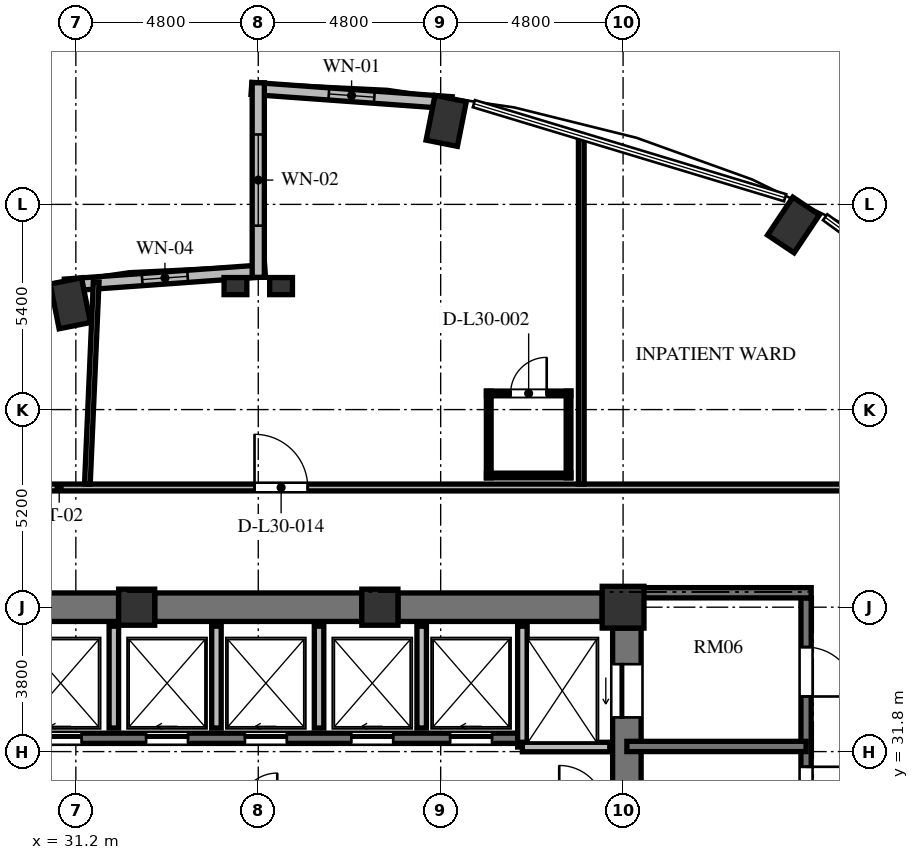
"""IFC4 building model, lengths in metres.
Left out: names, types, materials, properties, quantities, classifications, styles, units other than length and angle.
Written with IfcOpenShell. Run it as: python <this file> out.ifc"""

import sys

from ifc_helpers import new_model, si_unit, direction, frame, frame_2d, origin, origin_2d, place, context, subcontext, project, spatial, rectangle, extrude, element, fill, save


model = new_model("IFC4")
c1 = context("Model", 3, precision=1e-05, world=origin(), true_north=direction((0.0, 1.0)))
c2 = subcontext(c1, "Body", "Model", "MODEL_VIEW")
j1 = project(units=[si_unit("LENGTHUNIT", "METRE"), si_unit("PLANEANGLEUNIT", "RADIAN")], contexts=[c1])
p1 = place(None, origin())
s1 = spatial("IfcSite", under=j1, at=p1, CompositionType="ELEMENT")
p2 = place(p1, origin())
s2 = spatial("IfcBuilding", under=s1, at=p2, CompositionType="ELEMENT")
p3 = place(p2, frame((0.0, 0.0, 118.224)))
s3 = spatial("IfcBuildingStorey", under=s2, at=p3, CompositionType="ELEMENT", Elevation=118.224)
for number, where, z_axis, x_axis in (
    (1, (50.084, 45.657, 0.0), (0.0, 0.0, 1.0), (0.556, 0.831, 0.0)),
    (2, (40.946, 48.397, 0.0), (0.0, 0.0, 1.0), (0.195, 0.981, 0.0)),
    (3, (31.054, 43.597, 0.0), (0.0, 0.0, 1.0), (-0.195, 0.981, 0.0)),
):
    element("IfcColumn", number, at=place(p3, frame(where, z_axis=z_axis, x_axis=x_axis)), inside=s3, PredefinedType="COLUMN", context=c2, shape_type="SweptSolid", body=[
        extrude(rectangle(XDim=1.2, YDim=0.84, at=origin_2d()), origin(), (0.0, 0.0, 1.0), 3.648),
    ])
p4 = place(p3, frame((45.6, 35.6, 0.0), z_axis=(0.0, 0.0, 1.0), x_axis=(1.0, 0.0, 0.0)))
e4 = element("IfcColumn", 4, at=p4, inside=s3, PredefinedType="COLUMN", context=c2, shape_type="SweptSolid", body=[
    extrude(rectangle(XDim=1.1, YDim=1.1, at=origin_2d()), origin(), (0.0, 0.0, 1.0), 3.648),
])
for number, where, z_axis, x_axis in (
    (5, (39.2, 35.6, 0.0), (0.0, 0.0, 1.0), (1.0, 0.0, 0.0)),
    (6, (32.8, 35.6, 0.0), (0.0, 0.0, 1.0), (1.0, 0.0, 0.0)),
):
    element("IfcColumn", number, at=place(p3, frame(where, z_axis=z_axis, x_axis=x_axis)), inside=s3, PredefinedType="COLUMN", context=c2, shape_type="SweptSolid", body=[
        extrude(rectangle(XDim=0.95, YDim=0.95, at=origin_2d()), origin(), (0.0, 0.0, 1.0), 3.648),
    ])
for number, where, z_axis, x_axis in (
    (7, (35.4, 44.05, 0.0), (0.0, 0.0, 1.0), (1.0, 0.0, 0.0)),
    (8, (36.6, 44.05, 0.0), (0.0, 0.0, 1.0), (1.0, 0.0, 0.0)),
):
    element("IfcColumn", number, at=place(p3, frame(where, z_axis=z_axis, x_axis=x_axis)), inside=s3, PredefinedType="PILASTER", context=c2, shape_type="SweptSolid", body=[
        extrude(rectangle(XDim=0.6, YDim=0.45, at=origin_2d()), origin(), (0.0, 0.0, 1.0), 3.648),
    ])
p5 = place(p3, frame((45.7, 20.95, 0.0), z_axis=(0.0, 0.0, 1.0), x_axis=(0.0, 1.0, 0.0)))
e9 = element("IfcWall", 9, at=p5, inside=s3, PredefinedType="SHEAR", context=c2, shape_type="SweptSolid", body=[
    extrude(rectangle(XDim=14.1, YDim=0.75, at=frame_2d((7.05, 0.0))), origin(), (0.0, 0.0, 1.0), 3.648),
])
p6 = place(p5, frame((11.75, 0.0, 0.0)))
e10 = element("IfcOpeningElement", 10, at=p6, cuts=e9, PredefinedType="OPENING", context=c2, shape_type="SweptSolid", body=[
    extrude(rectangle(XDim=1.4, YDim=2.3, at=frame_2d((0.7, 1.15))), frame((0.0, 0.385, 0.0), z_axis=(0.0, -1.0, 0.0), x_axis=(1.0, 0.0, 0.0)), (0.0, 0.0, 1.0), 0.77),
])
p7 = place(p5, frame((0.95, 0.0, 0.0)))
e11 = element("IfcOpeningElement", 11, at=p7, cuts=e9, PredefinedType="OPENING", context=c2, shape_type="SweptSolid", body=[
    extrude(rectangle(XDim=1.4, YDim=2.3, at=frame_2d((0.7, 1.15))), frame((0.0, 0.385, 0.0), z_axis=(0.0, -1.0, 0.0), x_axis=(1.0, 0.0, 0.0)), (0.0, 0.0, 1.0), 0.77),
])
p8 = place(p3, frame((26.95, 35.6, 0.0), z_axis=(0.0, 0.0, 1.0), x_axis=(1.0, 0.0, 0.0)))
e12 = element("IfcWall", 12, at=p8, inside=s3, PredefinedType="SHEAR", context=c2, shape_type="SweptSolid", body=[
    extrude(rectangle(XDim=5.375, YDim=0.75, at=frame_2d((2.688, 0.0))), origin(), (0.0, 0.0, 1.0), 3.648),
])
p9 = place(p3, frame((33.275, 35.6, 0.0), z_axis=(0.0, 0.0, 1.0), x_axis=(1.0, 0.0, 0.0)))
e13 = element("IfcWall", 13, at=p9, inside=s3, PredefinedType="SHEAR", context=c2, shape_type="SweptSolid", body=[
    extrude(rectangle(XDim=5.45, YDim=0.75, at=frame_2d((2.725, 0.0))), origin(), (0.0, 0.0, 1.0), 3.648),
])
p10 = place(p3, frame((39.675, 35.6, 0.0), z_axis=(0.0, 0.0, 1.0), x_axis=(1.0, 0.0, 0.0)))
e14 = element("IfcWall", 14, at=p10, inside=s3, PredefinedType="SHEAR", context=c2, shape_type="SweptSolid", body=[
    extrude(rectangle(XDim=5.375, YDim=0.75, at=frame_2d((2.688, 0.0))), origin(), (0.0, 0.0, 1.0), 3.648),
])
p11 = place(p3, frame((41.091, 48.875, 0.0), z_axis=(0.0, 0.0, 1.0), x_axis=(-0.997432364291, 0.071614793619, 0.0)))
e15 = element("IfcWall", 15, at=p11, inside=s3, PredefinedType="SOLIDWALL", context=c2, shape_type="SweptSolid", body=[
    extrude(rectangle(XDim=5.284, YDim=0.32, at=frame_2d((2.642, 0.0))), origin(), (0.0, 0.0, 1.0), 3.428),
])
p12 = place(p11, frame((2.042, 0.0, 0.85)))
e16 = element("IfcOpeningElement", 16, at=p12, cuts=e15, PredefinedType="OPENING", context=c2, shape_type="SweptSolid", body=[
    extrude(rectangle(XDim=1.2, YDim=2.2, at=frame_2d((0.6, 1.1))), frame((0.0, 0.17, 0.0), z_axis=(0.0, -1.0, 0.0), x_axis=(1.0, 0.0, 0.0)), (0.0, 0.0, 1.0), 0.34),
])
p13 = place(p3, frame((36.179, 44.453, 0.0), z_axis=(0.0, 0.0, 1.0), x_axis=(-0.997431890304, -0.071621394884, 0.0)))
e17 = element("IfcWall", 17, at=p13, inside=s3, PredefinedType="SOLIDWALL", context=c2, shape_type="SweptSolid", body=[
    extrude(rectangle(XDim=5.284, YDim=0.32, at=frame_2d((2.642, 0.0))), origin(), (0.0, 0.0, 1.0), 3.428),
])
p14 = place(p13, frame((2.042, 0.0, 0.85)))
e18 = element("IfcOpeningElement", 18, at=p14, cuts=e17, PredefinedType="OPENING", context=c2, shape_type="SweptSolid", body=[
    extrude(rectangle(XDim=1.2, YDim=1.8, at=frame_2d((0.6, 0.9))), frame((0.0, 0.17, 0.0), z_axis=(0.0, -1.0, 0.0), x_axis=(1.0, 0.0, 0.0)), (0.0, 0.0, 1.0), 0.34),
])
p15 = place(p3, frame((36.0, 49.4, 0.0), z_axis=(0.0, 0.0, 1.0), x_axis=(0.0, -1.0, 0.0)))
e19 = element("IfcWall", 19, at=p15, inside=s3, PredefinedType="SOLIDWALL", context=c2, shape_type="SweptSolid", body=[
    extrude(rectangle(XDim=5.12, YDim=0.32, at=frame_2d((2.56, 0.0))), origin(), (0.0, 0.0, 1.0), 3.428),
])
p16 = place(p15, frame((1.36, 0.0, 0.84)))
e20 = element("IfcOpeningElement", 20, at=p16, cuts=e19, PredefinedType="OPENING", context=c2, shape_type="SweptSolid", body=[
    extrude(rectangle(XDim=2.4, YDim=2.04, at=frame_2d((1.2, 1.02))), frame((0.0, 0.17, 0.0), z_axis=(0.0, -1.0, 0.0), x_axis=(1.0, 0.0, 0.0)), (0.0, 0.0, 1.0), 0.34),
])
p17 = place(p3, frame((26.55, 32.15, 0.0), z_axis=(0.0, 0.0, 1.0), x_axis=(1.0, 0.0, 0.0)))
e21 = element("IfcWall", 21, at=p17, inside=s3, PredefinedType="SHEAR", context=c2, shape_type="SweptSolid", body=[
    extrude(rectangle(XDim=16.4, YDim=0.27, at=frame_2d((8.2, 0.0))), origin(), (0.0, 0.0, 1.0), 3.648),
])
p18 = place(p17, frame((1.1, 0.0, 0.0)))
e22 = element("IfcOpeningElement", 22, at=p18, cuts=e21, PredefinedType="OPENING", context=c2, shape_type="SweptSolid", body=[
    extrude(rectangle(XDim=1.1, YDim=2.2, at=frame_2d((0.55, 1.1))), frame((0.0, 0.145, 0.0), z_axis=(0.0, -1.0, 0.0), x_axis=(1.0, 0.0, 0.0)), (0.0, 0.0, 1.0), 0.29),
])
p19 = place(p17, frame((3.7, 0.0, 0.0)))
e23 = element("IfcOpeningElement", 23, at=p19, cuts=e21, PredefinedType="OPENING", context=c2, shape_type="SweptSolid", body=[
    extrude(rectangle(XDim=1.1, YDim=2.2, at=frame_2d((0.55, 1.1))), frame((0.0, 0.145, 0.0), z_axis=(0.0, -1.0, 0.0), x_axis=(1.0, 0.0, 0.0)), (0.0, 0.0, 1.0), 0.29),
])
p20 = place(p17, frame((6.5, 0.0, 0.0)))
e24 = element("IfcOpeningElement", 24, at=p20, cuts=e21, PredefinedType="OPENING", context=c2, shape_type="SweptSolid", body=[
    extrude(rectangle(XDim=1.1, YDim=2.2, at=frame_2d((0.55, 1.1))), frame((0.0, 0.145, 0.0), z_axis=(0.0, -1.0, 0.0), x_axis=(1.0, 0.0, 0.0)), (0.0, 0.0, 1.0), 0.29),
])
p21 = place(p17, frame((9.1, 0.0, 0.0)))
e25 = element("IfcOpeningElement", 25, at=p21, cuts=e21, PredefinedType="OPENING", context=c2, shape_type="SweptSolid", body=[
    extrude(rectangle(XDim=1.1, YDim=2.2, at=frame_2d((0.55, 1.1))), frame((0.0, 0.145, 0.0), z_axis=(0.0, -1.0, 0.0), x_axis=(1.0, 0.0, 0.0)), (0.0, 0.0, 1.0), 0.29),
])
p22 = place(p17, frame((11.9, 0.0, 0.0)))
e26 = element("IfcOpeningElement", 26, at=p22, cuts=e21, PredefinedType="OPENING", context=c2, shape_type="SweptSolid", body=[
    extrude(rectangle(XDim=1.1, YDim=2.2, at=frame_2d((0.55, 1.1))), frame((0.0, 0.145, 0.0), z_axis=(0.0, -1.0, 0.0), x_axis=(1.0, 0.0, 0.0)), (0.0, 0.0, 1.0), 0.29),
])
p23 = place(p17, frame((14.5, 0.0, 0.0)))
e27 = element("IfcOpeningElement", 27, at=p23, cuts=e21, PredefinedType="OPENING", context=c2, shape_type="SweptSolid", body=[
    extrude(rectangle(XDim=1.1, YDim=2.2, at=frame_2d((0.55, 1.1))), frame((0.0, 0.145, 0.0), z_axis=(0.0, -1.0, 0.0), x_axis=(1.0, 0.0, 0.0)), (0.0, 0.0, 1.0), 0.29),
])
p24 = place(p3, frame((42.95, 31.92, 0.0), z_axis=(0.0, 0.0, 1.0), x_axis=(0.0, 1.0, 0.0)))
e28 = element("IfcWall", 28, at=p24, inside=s3, PredefinedType="SOLIDWALL", context=c2, shape_type="SweptSolid", body=[
    extrude(rectangle(XDim=3.18, YDim=0.25, at=frame_2d((1.59, 0.0))), origin(), (0.0, 0.0, 1.0), 3.428),
])
p25 = place(p3, frame((42.95, 31.92, 0.0), z_axis=(0.0, 0.0, 1.0), x_axis=(1.0, 0.0, 0.0)))
e29 = element("IfcWall", 29, at=p25, inside=s3, PredefinedType="SOLIDWALL", context=c2, shape_type="SweptSolid", body=[
    extrude(rectangle(XDim=2.3, YDim=0.25, at=frame_2d((1.15, 0.0))), origin(), (0.0, 0.0, 1.0), 3.428),
])
for number, where, z_axis, x_axis in (
    (30, (32.2, 32.42, 0.0), (0.0, 0.0, 1.0), (0.0, 1.0, 0.0)),
    (31, (34.9, 32.42, 0.0), (0.0, 0.0, 1.0), (0.0, 1.0, 0.0)),
    (32, (37.6, 32.42, 0.0), (0.0, 0.0, 1.0), (0.0, 1.0, 0.0)),
    (33, (40.3, 32.42, 0.0), (0.0, 0.0, 1.0), (0.0, 1.0, 0.0)),
):
    element("IfcWall", number, at=place(p3, frame(where, z_axis=z_axis, x_axis=x_axis)), inside=s3, PredefinedType="SOLIDWALL", context=c2, shape_type="SweptSolid", body=[
        extrude(rectangle(XDim=2.68, YDim=0.25, at=frame_2d((1.34, 0.0))), origin(), (0.0, 0.0, 1.0), 3.428),
    ])
p26 = place(p3, frame((50.415, 35.845, 0.0), z_axis=(0.0, 0.0, 1.0), x_axis=(0.0, -1.0, 0.0)))
e34 = element("IfcWall", 34, at=p26, inside=s3, PredefinedType="SHEAR", context=c2, shape_type="SweptSolid", body=[
    extrude(rectangle(XDim=15.825, YDim=0.27, at=frame_2d((7.913, 0.0))), origin(), (0.0, 0.0, 1.0), 3.648),
])
p27 = place(p26, frame((4.445, 0.0, 0.0)))
e35 = element("IfcOpeningElement", 35, at=p27, cuts=e34, PredefinedType="OPENING", context=c2, shape_type="SweptSolid", body=[
    extrude(rectangle(XDim=1.2, YDim=2.15, at=frame_2d((0.6, 1.075))), frame((0.0, 0.145, 0.0), z_axis=(0.0, -1.0, 0.0), x_axis=(1.0, 0.0, 0.0)), (0.0, 0.0, 1.0), 0.29),
])
p28 = place(p26, frame((1.295, 0.0, 0.0)))
e36 = element("IfcOpeningElement", 36, at=p28, cuts=e34, PredefinedType="OPENING", context=c2, shape_type="SweptSolid", body=[
    extrude(rectangle(XDim=1.3, YDim=2.2, at=frame_2d((0.65, 1.1))), frame((0.0, 0.145, 0.0), z_axis=(0.0, -1.0, 0.0), x_axis=(1.0, 0.0, 0.0)), (0.0, 0.0, 1.0), 0.29),
])
p29 = place(p26, frame((13.095, 0.0, 0.0)))
e37 = element("IfcOpeningElement", 37, at=p29, cuts=e34, PredefinedType="OPENING", context=c2, shape_type="SweptSolid", body=[
    extrude(rectangle(XDim=1.3, YDim=2.2, at=frame_2d((0.65, 1.1))), frame((0.0, 0.145, 0.0), z_axis=(0.0, -1.0, 0.0), x_axis=(1.0, 0.0, 0.0)), (0.0, 0.0, 1.0), 0.29),
])
p30 = place(p3, frame((46.075, 35.98, 0.0), z_axis=(0.0, 0.0, 1.0), x_axis=(1.0, 0.0, 0.0)))
e38 = element("IfcWall", 38, at=p30, inside=s3, PredefinedType="SHEAR", context=c2, shape_type="SweptSolid", body=[
    extrude(rectangle(XDim=4.475, YDim=0.27, at=frame_2d((2.238, 0.0))), origin(), (0.0, 0.0, 1.0), 3.648),
])
p31 = place(p3, frame((45.7, 31.935, 0.0), z_axis=(0.0, 0.0, 1.0), x_axis=(1.0, 0.0, 0.0)))
e39 = element("IfcWall", 39, at=p31, inside=s3, PredefinedType="SHEAR", context=c2, shape_type="SweptSolid", body=[
    extrude(rectangle(XDim=4.715, YDim=0.27, at=frame_2d((2.357, 0.0))), origin(), (0.0, 0.0, 1.0), 3.648),
])
p32 = place(p3, frame((23.287, 38.75, 0.0), z_axis=(0.0, 0.0, 1.0), x_axis=(1.0, 0.0, 0.0)))
e40 = element("IfcWall", 40, at=p32, inside=s3, PredefinedType="PARTITIONING", context=c2, shape_type="SweptSolid", body=[
    extrude(rectangle(XDim=29.903, YDim=0.18, at=frame_2d((14.952, 0.0))), origin(), (0.0, 0.0, 1.0), 3.053),
])
p33 = place(p32, frame((12.615, 0.0, 0.0)))
e41 = element("IfcOpeningElement", 41, at=p33, cuts=e40, PredefinedType="OPENING", context=c2, shape_type="SweptSolid", body=[
    extrude(rectangle(XDim=1.4, YDim=2.2, at=frame_2d((0.7, 1.1))), frame((0.0, 0.1, 0.0), z_axis=(0.0, -1.0, 0.0), x_axis=(1.0, 0.0, 0.0)), (0.0, 0.0, 1.0), 0.2),
])
p34 = place(p32, frame((3.567, 0.0, 0.0)))
e42 = element("IfcOpeningElement", 42, at=p34, cuts=e40, PredefinedType="OPENING", context=c2, shape_type="SweptSolid", body=[
    extrude(rectangle(XDim=1.4, YDim=2.2, at=frame_2d((0.7, 1.1))), frame((0.0, 0.1, 0.0), z_axis=(0.0, -1.0, 0.0), x_axis=(1.0, 0.0, 0.0)), (0.0, 0.0, 1.0), 0.2),
])
p35 = place(p3, frame((31.503, 38.84, 0.0), z_axis=(0.0, 0.0, 1.0), x_axis=(0.043494903789, 0.999053648882, 0.0)))
e43 = element("IfcWall", 43, at=p35, inside=s3, PredefinedType="PARTITIONING", context=c2, shape_type="SweptSolid", body=[
    extrude(rectangle(XDim=5.327, YDim=0.15, at=frame_2d((2.664, 0.0))), origin(), (0.0, 0.0, 1.0), 2.813),
])
p36 = place(p3, frame((44.5, 38.84, 0.0), z_axis=(0.0, 0.0, 1.0), x_axis=(0.0, 1.0, 0.0)))
e44 = element("IfcWall", 44, at=p36, inside=s3, PredefinedType="PARTITIONING", context=c2, shape_type="SweptSolid", body=[
    extrude(rectangle(XDim=9.143, YDim=0.15, at=frame_2d((4.571, 0.0))), origin(), (0.0, 0.0, 1.0), 3.428),
])
p37 = place(p3, frame((42.005, 41.225, 0.0), z_axis=(0.0, 0.0, 1.0), x_axis=(1.0, 0.0, 0.0)))
e45 = element("IfcWall", 45, at=p37, inside=s3, PredefinedType="PARTITIONING", context=c2, shape_type="SweptSolid", body=[
    extrude(rectangle(XDim=2.22, YDim=0.125, at=frame_2d((1.11, 0.0))), origin(), (0.0, 0.0, 1.0), 3.428),
])
p38 = place(p37, frame((0.635, 0.0, 0.0)))
e46 = element("IfcOpeningElement", 46, at=p38, cuts=e45, PredefinedType="OPENING", context=c2, shape_type="SweptSolid", body=[
    extrude(rectangle(XDim=0.95, YDim=2.1, at=frame_2d((0.475, 1.05))), frame((0.0, 0.073, 0.0), z_axis=(0.0, -1.0, 0.0), x_axis=(1.0, 0.0, 0.0)), (0.0, 0.0, 1.0), 0.145),
])
p39 = place(p3, frame((42.005, 39.065, 0.0), z_axis=(0.0, 0.0, 1.0), x_axis=(1.0, 0.0, 0.0)))
e47 = element("IfcWall", 47, at=p39, inside=s3, PredefinedType="PARTITIONING", context=c2, shape_type="SweptSolid", body=[
    extrude(rectangle(XDim=2.22, YDim=0.125, at=frame_2d((1.11, 0.0))), origin(), (0.0, 0.0, 1.0), 3.428),
])
for number, where, z_axis, x_axis in (
    (48, (44.165, 39.005, 0.0), (0.0, 0.0, 1.0), (0.0, 1.0, 0.0)),
    (49, (42.065, 39.005, 0.0), (0.0, 0.0, 1.0), (0.0, 1.0, 0.0)),
):
    element("IfcWall", number, at=place(p3, frame(where, z_axis=z_axis, x_axis=x_axis)), inside=s3, PredefinedType="PARTITIONING", context=c2, shape_type="SweptSolid", body=[
        extrude(rectangle(XDim=2.28, YDim=0.125, at=frame_2d((1.14, 0.0))), origin(), (0.0, 0.0, 1.0), 3.428),
    ])
p40 = place(p12, origin())
e50 = element("IfcWindow", 50, at=p40, inside=s3, PartitioningType="SINGLE_PANEL", PredefinedType="WINDOW", context=c2, shape_type="SweptSolid", body=[
    extrude(rectangle(XDim=1.2, YDim=2.2, at=frame_2d((0.6, 1.1))), frame((0.0, 0.03, 0.0), z_axis=(0.0, -1.0, 0.0), x_axis=(1.0, 0.0, 0.0)), (0.0, 0.0, 1.0), 0.06),
])
fill(e16, e50)
p41 = place(p14, origin())
e51 = element("IfcWindow", 51, at=p41, inside=s3, PartitioningType="SINGLE_PANEL", PredefinedType="WINDOW", context=c2, shape_type="SweptSolid", body=[
    extrude(rectangle(XDim=1.2, YDim=1.8, at=frame_2d((0.6, 0.9))), frame((0.0, 0.03, 0.0), z_axis=(0.0, -1.0, 0.0), x_axis=(1.0, 0.0, 0.0)), (0.0, 0.0, 1.0), 0.06),
])
fill(e18, e51)
p42 = place(p16, origin())
e52 = element("IfcWindow", 52, at=p42, inside=s3, PartitioningType="SINGLE_PANEL", PredefinedType="WINDOW", context=c2, shape_type="SweptSolid", body=[
    extrude(rectangle(XDim=2.4, YDim=2.04, at=frame_2d((1.2, 1.02))), frame((0.0, 0.03, 0.0), z_axis=(0.0, -1.0, 0.0), x_axis=(1.0, 0.0, 0.0)), (0.0, 0.0, 1.0), 0.06),
])
fill(e20, e52)
p43 = place(p19, origin())
e53 = element("IfcDoor", 53, at=p43, inside=s3, OperationType="SLIDING_TO_LEFT", PredefinedType="DOOR", context=c2, shape_type="SweptSolid", body=[
    extrude(rectangle(XDim=1.1, YDim=2.2, at=frame_2d((0.55, 1.1))), frame((0.0, 0.025, 0.0), z_axis=(0.0, -1.0, 0.0), x_axis=(1.0, 0.0, 0.0)), (0.0, 0.0, 1.0), 0.05),
])
fill(e23, e53)
p44 = place(p20, origin())
e54 = element("IfcDoor", 54, at=p44, inside=s3, OperationType="SLIDING_TO_LEFT", PredefinedType="DOOR", context=c2, shape_type="SweptSolid", body=[
    extrude(rectangle(XDim=1.1, YDim=2.2, at=frame_2d((0.55, 1.1))), frame((0.0, 0.025, 0.0), z_axis=(0.0, -1.0, 0.0), x_axis=(1.0, 0.0, 0.0)), (0.0, 0.0, 1.0), 0.05),
])
fill(e24, e54)
p45 = place(p21, origin())
e55 = element("IfcDoor", 55, at=p45, inside=s3, OperationType="SLIDING_TO_LEFT", PredefinedType="DOOR", context=c2, shape_type="SweptSolid", body=[
    extrude(rectangle(XDim=1.1, YDim=2.2, at=frame_2d((0.55, 1.1))), frame((0.0, 0.025, 0.0), z_axis=(0.0, -1.0, 0.0), x_axis=(1.0, 0.0, 0.0)), (0.0, 0.0, 1.0), 0.05),
])
fill(e25, e55)
p46 = place(p22, origin())
e56 = element("IfcDoor", 56, at=p46, inside=s3, OperationType="SLIDING_TO_LEFT", PredefinedType="DOOR", context=c2, shape_type="SweptSolid", body=[
    extrude(rectangle(XDim=1.1, YDim=2.2, at=frame_2d((0.55, 1.1))), frame((0.0, 0.025, 0.0), z_axis=(0.0, -1.0, 0.0), x_axis=(1.0, 0.0, 0.0)), (0.0, 0.0, 1.0), 0.05),
])
fill(e26, e56)
p47 = place(p23, origin())
e57 = element("IfcDoor", 57, at=p47, inside=s3, OperationType="SLIDING_TO_LEFT", PredefinedType="DOOR", context=c2, shape_type="SweptSolid", body=[
    extrude(rectangle(XDim=1.1, YDim=2.2, at=frame_2d((0.55, 1.1))), frame((0.0, 0.025, 0.0), z_axis=(0.0, -1.0, 0.0), x_axis=(1.0, 0.0, 0.0)), (0.0, 0.0, 1.0), 0.05),
])
fill(e27, e57)
p48 = place(p6, origin())
e58 = element("IfcDoor", 58, at=p48, inside=s3, OperationType="SLIDING_TO_LEFT", PredefinedType="DOOR", context=c2, shape_type="SweptSolid", body=[
    extrude(rectangle(XDim=1.4, YDim=2.3, at=frame_2d((0.7, 1.15))), frame((0.0, 0.025, 0.0), z_axis=(0.0, -1.0, 0.0), x_axis=(1.0, 0.0, 0.0)), (0.0, 0.0, 1.0), 0.05),
])
fill(e10, e58)
p49 = place(p27, origin())
e59 = element("IfcDoor", 59, at=p49, inside=s3, OperationType="SINGLE_SWING_LEFT", PredefinedType="DOOR", context=c2, shape_type="SweptSolid", body=[
    extrude(rectangle(XDim=1.2, YDim=2.15, at=frame_2d((0.6, 1.075))), frame((0.0, 0.025, 0.0), z_axis=(0.0, -1.0, 0.0), x_axis=(1.0, 0.0, 0.0)), (0.0, 0.0, 1.0), 0.05),
])
fill(e35, e59)
p50 = place(p28, origin())
e60 = element("IfcDoor", 60, at=p50, inside=s3, OperationType="SINGLE_SWING_RIGHT", PredefinedType="DOOR", context=c2, shape_type="SweptSolid", body=[
    extrude(rectangle(XDim=1.3, YDim=2.2, at=frame_2d((0.65, 1.1))), frame((0.0, 0.025, 0.0), z_axis=(0.0, -1.0, 0.0), x_axis=(1.0, 0.0, 0.0)), (0.0, 0.0, 1.0), 0.05),
])
fill(e36, e60)
p51 = place(p38, origin())
e61 = element("IfcDoor", 61, at=p51, inside=s3, OperationType="SINGLE_SWING_RIGHT", PredefinedType="DOOR", context=c2, shape_type="SweptSolid", body=[
    extrude(rectangle(XDim=0.95, YDim=2.1, at=frame_2d((0.475, 1.05))), frame((0.0, 0.025, 0.0), z_axis=(0.0, -1.0, 0.0), x_axis=(1.0, 0.0, 0.0)), (0.0, 0.0, 1.0), 0.05),
])
fill(e46, e61)
p52 = place(p33, origin())
e62 = element("IfcDoor", 62, at=p52, inside=s3, OperationType="SINGLE_SWING_LEFT", PredefinedType="DOOR", context=c2, shape_type="SweptSolid", body=[
    extrude(rectangle(XDim=1.4, YDim=2.2, at=frame_2d((0.7, 1.1))), frame((0.0, 0.025, 0.0), z_axis=(0.0, -1.0, 0.0), x_axis=(1.0, 0.0, 0.0)), (0.0, 0.0, 1.0), 0.05),
])
fill(e41, e62)
save(model, sys.argv[1])
